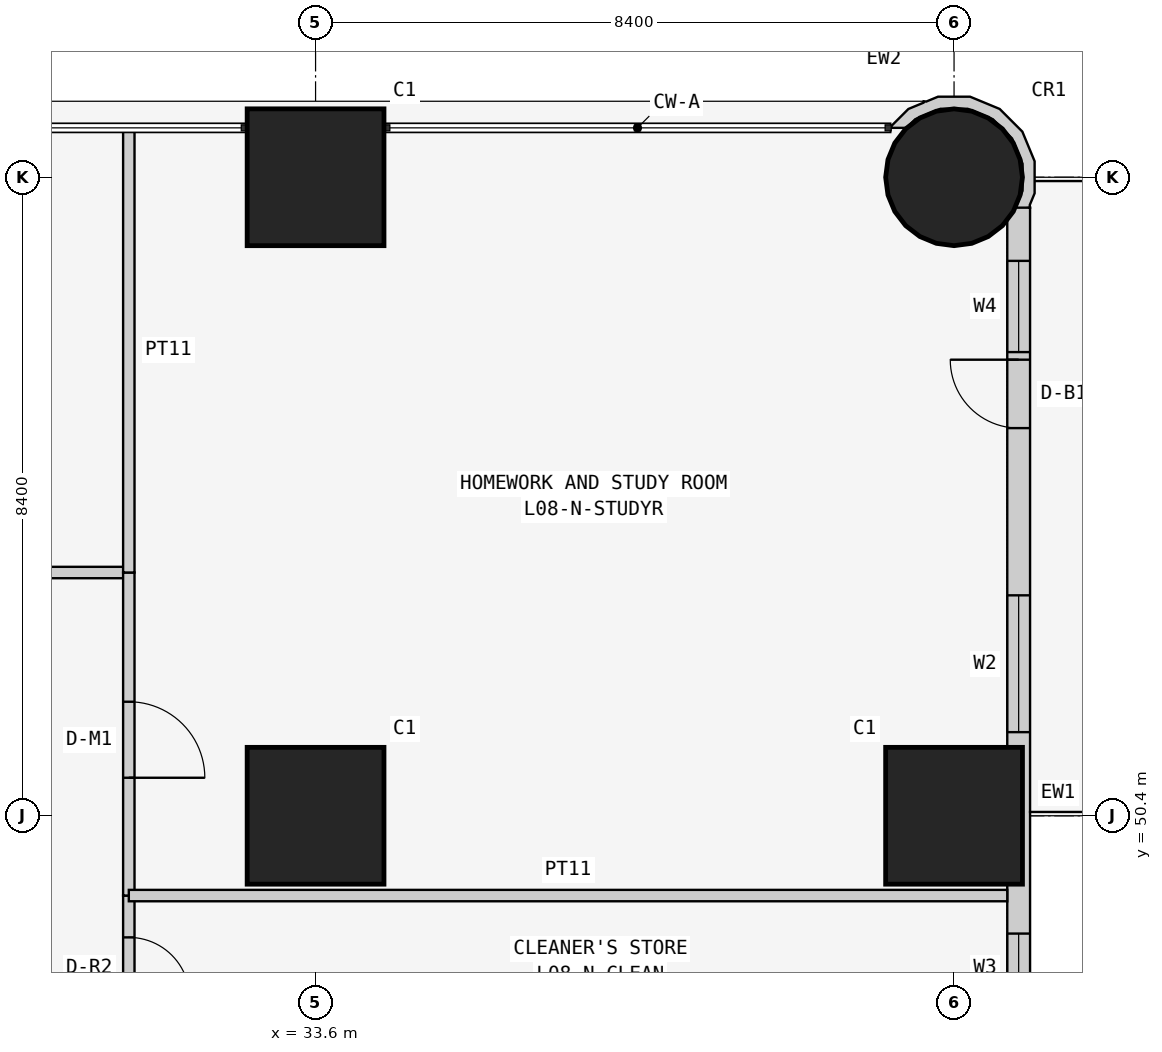
"""IFC4 building model, lengths in metres.
Left out: names, types, materials, properties, quantities, classifications, styles, units other than length and angle.
Written with IfcOpenShell. Run it as: python <this file> out.ifc"""

import sys

from ifc_helpers import new_model, si_unit, direction, frame, frame_2d, origin, origin_2d, place, context, subcontext, project, spatial, polyline, rectangle, circle, outline, extrude, element, fill, save


model = new_model("IFC4")
c1 = context("Model", 3, precision=1e-05, world=origin(), true_north=direction((0.0, 1.0)))
c2 = subcontext(c1, "Body", "Model", "MODEL_VIEW")
j1 = project(units=[si_unit("LENGTHUNIT", "METRE"), si_unit("PLANEANGLEUNIT", "RADIAN")], contexts=[c1])
p1 = place(None, origin())
s1 = spatial("IfcSite", under=j1, at=p1, CompositionType="ELEMENT")
p2 = place(p1, origin())
s2 = spatial("IfcBuilding", under=s1, at=p2, CompositionType="ELEMENT")
p3 = place(p2, frame((0.0, 0.0, 38.1)))
s3 = spatial("IfcBuildingStorey", under=s2, at=p3, CompositionType="ELEMENT", Elevation=38.1)
for number, where, z_axis, x_axis in (
    (1, (33.6, 50.4, 0.0), (0.0, 0.0, 1.0), (1.0, 0.0, 0.0)),
    (2, (33.6, 58.8, 0.0), (0.0, 0.0, 1.0), (1.0, 0.0, 0.0)),
    (3, (42.0, 50.4, 0.0), (0.0, 0.0, 1.0), (1.0, 0.0, 0.0)),
):
    element("IfcColumn", number, at=place(p3, frame(where, z_axis=z_axis, x_axis=x_axis)), inside=s3, PredefinedType="COLUMN", context=c2, shape_type="SweptSolid", body=[
        extrude(rectangle(XDim=1.8, YDim=1.8, at=origin_2d()), origin(), (0.0, 0.0, 1.0), 3.6),
    ])
p4 = place(p3, frame((42.0, 58.8, 0.0), z_axis=(0.0, 0.0, 1.0), x_axis=(1.0, 0.0, 0.0)))
e4 = element("IfcColumn", 4, at=p4, inside=s3, PredefinedType="COLUMN", context=c2, shape_type="SweptSolid", body=[
    extrude(circle(Radius=0.9, at=origin_2d()), origin(), (0.0, 0.0, 1.0), 3.6),
])
p5 = place(p3, frame((42.85, 43.0, 0.0), z_axis=(0.0, 0.0, 1.0), x_axis=(0.0, 1.0, 0.0)))
e5 = element("IfcWall", 5, at=p5, inside=s3, PredefinedType="SOLIDWALL", context=c2, shape_type="SweptSolid", body=[
    extrude(rectangle(XDim=15.4, YDim=0.3, at=frame_2d((7.7, 0.0))), origin(), (0.0, 0.0, 1.0), 3.45),
])
p6 = place(p5, frame((1.2, 0.0, 0.9)))
e6 = element("IfcOpeningElement", 6, at=p6, cuts=e5, PredefinedType="OPENING", context=c2, shape_type="SweptSolid", body=[
    extrude(rectangle(XDim=1.8, YDim=1.5, at=frame_2d((0.9, 0.75))), frame((0.0, 0.16, 0.0), z_axis=(0.0, -1.0, 0.0), x_axis=(1.0, 0.0, 0.0)), (0.0, 0.0, 1.0), 0.32),
])
p7 = place(p5, frame((4.95, 0.0, 1.5)))
e7 = element("IfcOpeningElement", 7, at=p7, cuts=e5, PredefinedType="OPENING", context=c2, shape_type="SweptSolid", body=[
    extrude(rectangle(XDim=0.9, YDim=0.7, at=frame_2d((0.45, 0.35))), frame((0.0, 0.16, 0.0), z_axis=(0.0, -1.0, 0.0), x_axis=(1.0, 0.0, 0.0)), (0.0, 0.0, 1.0), 0.32),
])
p8 = place(p5, frame((8.5, 0.0, 0.9)))
e8 = element("IfcOpeningElement", 8, at=p8, cuts=e5, PredefinedType="OPENING", context=c2, shape_type="SweptSolid", body=[
    extrude(rectangle(XDim=1.8, YDim=1.5, at=frame_2d((0.9, 0.75))), frame((0.0, 0.16, 0.0), z_axis=(0.0, -1.0, 0.0), x_axis=(1.0, 0.0, 0.0)), (0.0, 0.0, 1.0), 0.32),
])
p9 = place(p5, frame((12.5, 0.0, 0.0)))
e9 = element("IfcOpeningElement", 9, at=p9, cuts=e5, PredefinedType="OPENING", context=c2, shape_type="SweptSolid", body=[
    extrude(rectangle(XDim=0.9, YDim=2.4, at=frame_2d((0.45, 1.2))), frame((0.0, 0.16, 0.0), z_axis=(0.0, -1.0, 0.0), x_axis=(1.0, 0.0, 0.0)), (0.0, 0.0, 1.0), 0.32),
])
p10 = place(p5, frame((13.5, 0.0, 0.9)))
e10 = element("IfcOpeningElement", 10, at=p10, cuts=e5, PredefinedType="OPENING", context=c2, shape_type="SweptSolid", body=[
    extrude(rectangle(XDim=1.2, YDim=1.5, at=frame_2d((0.6, 0.75))), frame((0.0, 0.16, 0.0), z_axis=(0.0, -1.0, 0.0), x_axis=(1.0, 0.0, 0.0)), (0.0, 0.0, 1.0), 0.32),
])
p11 = place(p3, frame((42.91, 58.436, 0.0), z_axis=(0.0, 0.0, 1.0), x_axis=(0.377204953059, 0.926129809145, 0.0)))
e11 = element("IfcWall", 11, at=p11, inside=s3, PredefinedType="SOLIDWALL", context=c2, shape_type="SweptSolid", body=[
    extrude(outline(polyline([(0.769, 1.728), (0.75, 1.723), (0.6, 1.875), (0.295, 2.004), (0.281, 1.998), (0.36, 1.803), (0.509, 1.741), (0.761, 1.486), (0.896, 1.154), (0.894, 0.795), (0.755, 0.465), (0.5, 0.213), (0.168, 0.078), (-0.1, 0.08), (0.001, -0.097), (0.03, -0.08), (0.198, -0.081), (0.589, 0.078), (0.889, 0.374), (1.052, 0.763), (1.055, 1.185), (0.896, 1.575), (0.778, 1.695), (0.769, 1.728)])), origin(), (0.0, 0.0, 1.0), 3.45),
])
p12 = place(p3, frame((31.143, 53.6, 0.0), z_axis=(0.0, 0.0, 1.0), x_axis=(-1.0, 0.0, 0.0)))
e12 = element("IfcWall", 12, at=p12, inside=s3, PredefinedType="PARTITIONING", context=c2, shape_type="SweptSolid", body=[
    extrude(rectangle(XDim=3.486, YDim=0.15, at=frame_2d((1.743, 0.0))), origin(), (0.0, 0.0, 1.0), 3.45),
])
p13 = place(p3, frame((31.143, 47.6, 0.0), z_axis=(0.0, 0.0, 1.0), x_axis=(0.0, 1.0, 0.0)))
e13 = element("IfcWall", 13, at=p13, inside=s3, PredefinedType="PARTITIONING", context=c2, shape_type="SweptSolid", body=[
    extrude(rectangle(XDim=1.75, YDim=0.15, at=frame_2d((0.875, 0.0))), origin(), (0.0, 0.0, 1.0), 3.45),
])
p14 = place(p13, frame((0.4, 0.0, 0.0)))
e14 = element("IfcOpeningElement", 14, at=p14, cuts=e13, PredefinedType="OPENING", context=c2, shape_type="SweptSolid", body=[
    extrude(rectangle(XDim=0.8, YDim=2.1, at=frame_2d((0.4, 1.05))), frame((0.0, 0.085, 0.0), z_axis=(0.0, -1.0, 0.0), x_axis=(1.0, 0.0, 0.0)), (0.0, 0.0, 1.0), 0.17),
])
p15 = place(p3, frame((31.143, 49.35, 0.0), z_axis=(0.0, 0.0, 1.0), x_axis=(0.0, 1.0, 0.0)))
e15 = element("IfcWall", 15, at=p15, inside=s3, PredefinedType="PARTITIONING", context=c2, shape_type="SweptSolid", body=[
    extrude(rectangle(XDim=4.25, YDim=0.15, at=frame_2d((2.125, 0.0))), origin(), (0.0, 0.0, 1.0), 3.45),
])
p16 = place(p15, frame((1.55, 0.0, 0.0)))
e16 = element("IfcOpeningElement", 16, at=p16, cuts=e15, PredefinedType="OPENING", context=c2, shape_type="SweptSolid", body=[
    extrude(rectangle(XDim=1.0, YDim=2.1, at=frame_2d((0.5, 1.05))), frame((0.0, 0.085, 0.0), z_axis=(0.0, -1.0, 0.0), x_axis=(1.0, 0.0, 0.0)), (0.0, 0.0, 1.0), 0.17),
])
p17 = place(p3, frame((31.143, 59.45, 0.0), z_axis=(0.0, 0.0, 1.0), x_axis=(0.0, -1.0, 0.0)))
e17 = element("IfcWall", 17, at=p17, inside=s3, PredefinedType="PARTITIONING", context=c2, shape_type="SweptSolid", body=[
    extrude(rectangle(XDim=5.85, YDim=0.15, at=frame_2d((2.925, 0.0))), origin(), (0.0, 0.0, 1.0), 3.45),
])
p18 = place(p3, frame((42.7, 49.35, 0.0), z_axis=(0.0, 0.0, 1.0), x_axis=(-1.0, 0.0, 0.0)))
e18 = element("IfcWall", 18, at=p18, inside=s3, PredefinedType="PARTITIONING", context=c2, shape_type="SweptSolid", body=[
    extrude(rectangle(XDim=11.557, YDim=0.15, at=frame_2d((5.778, 0.0))), origin(), (0.0, 0.0, 1.0), 3.45),
])
p19 = place(p7, origin())
e19 = element("IfcWindow", 19, at=p19, inside=s3, PartitioningType="SINGLE_PANEL", PredefinedType="WINDOW", context=c2, shape_type="SweptSolid", body=[
    extrude(rectangle(XDim=0.9, YDim=0.7, at=frame_2d((0.45, 0.35))), frame((0.0, 0.03, 0.0), z_axis=(0.0, -1.0, 0.0), x_axis=(1.0, 0.0, 0.0)), (0.0, 0.0, 1.0), 0.06),
])
fill(e7, e19)
p20 = place(p8, origin())
e20 = element("IfcWindow", 20, at=p20, inside=s3, PartitioningType="SINGLE_PANEL", PredefinedType="WINDOW", context=c2, shape_type="SweptSolid", body=[
    extrude(rectangle(XDim=1.8, YDim=1.5, at=frame_2d((0.9, 0.75))), frame((0.0, 0.03, 0.0), z_axis=(0.0, -1.0, 0.0), x_axis=(1.0, 0.0, 0.0)), (0.0, 0.0, 1.0), 0.06),
])
fill(e8, e20)
p21 = place(p9, origin())
e21 = element("IfcDoor", 21, at=p21, inside=s3, OperationType="SINGLE_SWING_RIGHT", PredefinedType="DOOR", context=c2, shape_type="SweptSolid", body=[
    extrude(rectangle(XDim=0.9, YDim=2.4, at=frame_2d((0.45, 1.2))), frame((0.0, 0.025, 0.0), z_axis=(0.0, -1.0, 0.0), x_axis=(1.0, 0.0, 0.0)), (0.0, 0.0, 1.0), 0.05),
])
fill(e9, e21)
p22 = place(p10, origin())
e22 = element("IfcWindow", 22, at=p22, inside=s3, PartitioningType="SINGLE_PANEL", PredefinedType="WINDOW", context=c2, shape_type="SweptSolid", body=[
    extrude(rectangle(XDim=1.2, YDim=1.5, at=frame_2d((0.6, 0.75))), frame((0.0, 0.03, 0.0), z_axis=(0.0, -1.0, 0.0), x_axis=(1.0, 0.0, 0.0)), (0.0, 0.0, 1.0), 0.06),
])
fill(e10, e22)
p23 = place(p14, frame((0.8, 0.0, 0.0), z_axis=(0.0, 0.0, 1.0), x_axis=(-1.0, 0.0, 0.0)))
e23 = element("IfcDoor", 23, at=p23, inside=s3, OperationType="SINGLE_SWING_RIGHT", PredefinedType="DOOR", context=c2, shape_type="SweptSolid", body=[
    extrude(rectangle(XDim=0.8, YDim=2.1, at=frame_2d((0.4, 1.05))), frame((0.0, 0.025, 0.0), z_axis=(0.0, -1.0, 0.0), x_axis=(1.0, 0.0, 0.0)), (0.0, 0.0, 1.0), 0.05),
])
fill(e14, e23)
p24 = place(p16, frame((1.0, 0.0, 0.0), z_axis=(0.0, 0.0, 1.0), x_axis=(-1.0, 0.0, 0.0)))
e24 = element("IfcDoor", 24, at=p24, inside=s3, OperationType="SINGLE_SWING_RIGHT", PredefinedType="DOOR", context=c2, shape_type="SweptSolid", body=[
    extrude(rectangle(XDim=1.0, YDim=2.1, at=frame_2d((0.5, 1.05))), frame((0.0, 0.025, 0.0), z_axis=(0.0, -1.0, 0.0), x_axis=(1.0, 0.0, 0.0)), (0.0, 0.0, 1.0), 0.05),
])
fill(e16, e24)
save(model, sys.argv[1])
